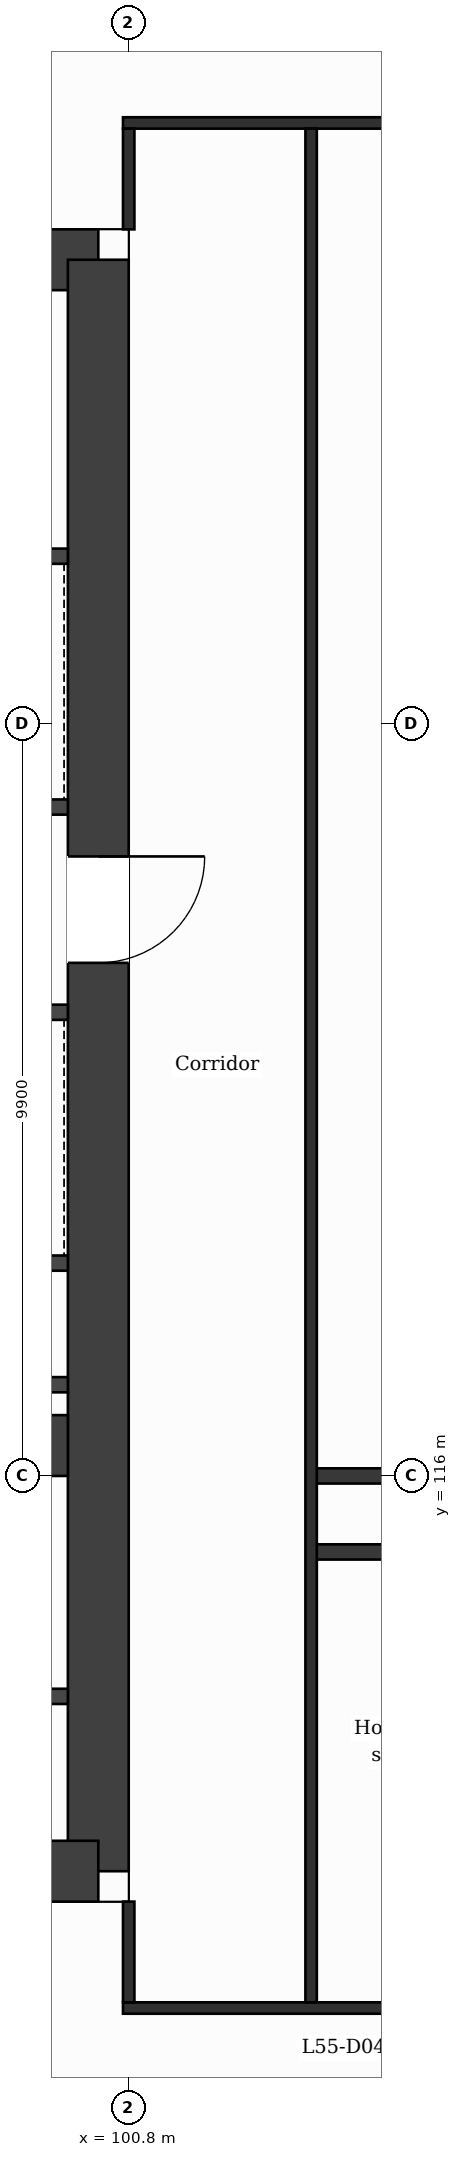
"""IFC4 building model, lengths in metres.
Left out: names, types, materials, properties, quantities, classifications, styles, units other than length and angle.
Written with IfcOpenShell. Run it as: python <this file> out.ifc"""

import sys

from ifc_helpers import new_model, si_unit, direction, frame, frame_2d, origin, place, context, subcontext, project, spatial, rectangle, extrude, element, fill, save


model = new_model("IFC4")
c1 = context("Model", 3, precision=1e-05, world=origin(), true_north=direction((0.0, 1.0)))
c2 = subcontext(c1, "Body", "Model", "MODEL_VIEW")
j1 = project(units=[si_unit("LENGTHUNIT", "METRE"), si_unit("PLANEANGLEUNIT", "RADIAN")], contexts=[c1])
p1 = place(None, origin())
s1 = spatial("IfcSite", under=j1, at=p1, CompositionType="ELEMENT")
p2 = place(p1, origin())
s2 = spatial("IfcBuilding", under=s1, at=p2, CompositionType="ELEMENT")
p3 = place(p2, frame((0.0, 0.0, 228.1)))
s3 = spatial("IfcBuildingStorey", under=s2, at=p3, CompositionType="ELEMENT", Elevation=228.1)
p4 = place(p3, frame((88.98, 132.0, 0.0), z_axis=(0.0, 0.0, 1.0), x_axis=(1.0, 0.0, 0.0)))
e1 = element("IfcWall", 1, at=p4, inside=s3, PredefinedType="SHEAR", context=c2, shape_type="SweptSolid", body=[
    extrude(rectangle(XDim=11.419, YDim=0.8, at=frame_2d((5.71, 0.0))), origin(), (0.0, 0.0, 1.0), 3.7),
])
p5 = place(p4, frame((6.833, 0.0, 0.0)))
e2 = element("IfcOpeningElement", 2, at=p5, cuts=e1, PredefinedType="OPENING", context=c2, shape_type="SweptSolid", body=[
    extrude(rectangle(XDim=1.2, YDim=2.1, at=frame_2d((0.6, 1.05))), frame((0.0, 0.41, 0.0), z_axis=(0.0, -1.0, 0.0), x_axis=(1.0, 0.0, 0.0)), (0.0, 0.0, 1.0), 0.82),
])
p6 = place(p3, frame((100.4, 132.0, 0.0), z_axis=(0.0, 0.0, 1.0), x_axis=(0.0, -1.0, 0.0)))
e3 = element("IfcWall", 3, at=p6, inside=s3, PredefinedType="SHEAR", context=c2, shape_type="SweptSolid", body=[
    extrude(rectangle(XDim=21.2, YDim=0.8, at=frame_2d((10.6, 0.0))), origin(), (0.0, 0.0, 1.0), 3.7),
])
p7 = place(p6, frame((7.85, 0.0, 0.0)))
e4 = element("IfcOpeningElement", 4, at=p7, cuts=e3, PredefinedType="OPENING", context=c2, shape_type="SweptSolid", body=[
    extrude(rectangle(XDim=1.4, YDim=2.1, at=frame_2d((0.7, 1.05))), frame((0.0, 0.41, 0.0), z_axis=(0.0, -1.0, 0.0), x_axis=(1.0, 0.0, 0.0)), (0.0, 0.0, 1.0), 0.82),
])
p8 = place(p3, frame((100.4, 110.8, 0.0), z_axis=(0.0, 0.0, 1.0), x_axis=(-1.0, 0.0, 0.0)))
e5 = element("IfcWall", 5, at=p8, inside=s3, PredefinedType="SHEAR", context=c2, shape_type="SweptSolid", body=[
    extrude(rectangle(XDim=14.273, YDim=0.8, at=frame_2d((7.137, 0.0))), origin(), (0.0, 0.0, 1.0), 3.7),
])
p9 = place(p8, frame((5.908, 0.0, 0.0)))
e6 = element("IfcOpeningElement", 6, at=p9, cuts=e5, PredefinedType="OPENING", context=c2, shape_type="SweptSolid", body=[
    extrude(rectangle(XDim=1.4, YDim=2.1, at=frame_2d((0.7, 1.05))), frame((0.0, 0.41, 0.0), z_axis=(0.0, -1.0, 0.0), x_axis=(1.0, 0.0, 0.0)), (0.0, 0.0, 1.0), 0.82),
])
p10 = place(p3, frame((94.7, 116.4, 0.0), z_axis=(0.0, 0.0, 1.0), x_axis=(1.0, 0.0, 0.0)))
e7 = element("IfcWall", 7, at=p10, inside=s3, PredefinedType="SHEAR", context=c2, shape_type="SweptSolid", body=[
    extrude(rectangle(XDim=5.3, YDim=0.8, at=frame_2d((2.65, 0.0))), origin(), (0.0, 0.0, 1.0), 3.7),
])
p11 = place(p3, frame((100.725, 109.0, 0.0), z_axis=(0.0, 0.0, 1.0), x_axis=(1.0, 0.0, 0.0)))
e8 = element("IfcWall", 8, at=p11, inside=s3, PredefinedType="PARTITIONING", context=c2, shape_type="SweptSolid", body=[
    extrude(rectangle(XDim=25.35, YDim=0.15, at=frame_2d((12.675, 0.0))), origin(), (0.0, 0.0, 1.0), 3.38),
])
p12 = place(p11, frame((6.8, 0.0, 0.0)))
e9 = element("IfcOpeningElement", 9, at=p12, cuts=e8, PredefinedType="OPENING", context=c2, shape_type="SweptSolid", body=[
    extrude(rectangle(XDim=1.0, YDim=2.1, at=frame_2d((0.5, 1.05))), frame((0.0, 0.085, 0.0), z_axis=(0.0, -1.0, 0.0), x_axis=(1.0, 0.0, 0.0)), (0.0, 0.0, 1.0), 0.17),
])
p13 = place(p11, frame((3.475, 0.0, 0.0)))
e10 = element("IfcOpeningElement", 10, at=p13, cuts=e8, PredefinedType="OPENING", context=c2, shape_type="SweptSolid", body=[
    extrude(rectangle(XDim=1.0, YDim=2.1, at=frame_2d((0.5, 1.05))), frame((0.0, 0.085, 0.0), z_axis=(0.0, -1.0, 0.0), x_axis=(1.0, 0.0, 0.0)), (0.0, 0.0, 1.0), 0.17),
])
p14 = place(p11, frame((10.5, 0.0, 0.0)))
e11 = element("IfcOpeningElement", 11, at=p14, cuts=e8, PredefinedType="OPENING", context=c2, shape_type="SweptSolid", body=[
    extrude(rectangle(XDim=1.0, YDim=2.1, at=frame_2d((0.5, 1.05))), frame((0.0, 0.085, 0.0), z_axis=(0.0, -1.0, 0.0), x_axis=(1.0, 0.0, 0.0)), (0.0, 0.0, 1.0), 0.17),
])
p15 = place(p11, frame((19.375, 0.0, 0.0)))
e12 = element("IfcOpeningElement", 12, at=p15, cuts=e8, PredefinedType="OPENING", context=c2, shape_type="SweptSolid", body=[
    extrude(rectangle(XDim=1.0, YDim=2.1, at=frame_2d((0.5, 1.05))), frame((0.0, 0.085, 0.0), z_axis=(0.0, -1.0, 0.0), x_axis=(1.0, 0.0, 0.0)), (0.0, 0.0, 1.0), 0.17),
])
p16 = place(p3, frame((95.127, 113.1, 0.0), z_axis=(0.0, 0.0, 1.0), x_axis=(1.0, 0.0, 0.0)))
e13 = element("IfcWall", 13, at=p16, inside=s3, PredefinedType="PARTITIONING", context=c2, shape_type="SweptSolid", body=[
    extrude(rectangle(XDim=4.873, YDim=0.2, at=frame_2d((2.437, 0.0))), origin(), (0.0, 0.0, 1.0), 3.38),
])
p17 = place(p16, frame((3.23, 0.0, 0.0)))
e14 = element("IfcOpeningElement", 14, at=p17, cuts=e13, PredefinedType="OPENING", context=c2, shape_type="SweptSolid", body=[
    extrude(rectangle(XDim=0.9, YDim=2.1, at=frame_2d((0.45, 1.05))), frame((0.0, 0.11, 0.0), z_axis=(0.0, -1.0, 0.0), x_axis=(1.0, 0.0, 0.0)), (0.0, 0.0, 1.0), 0.22),
])
p18 = place(p3, frame((103.2, 115.0, 0.0), z_axis=(0.0, 0.0, 1.0), x_axis=(1.0, 0.0, 0.0)))
e15 = element("IfcWall", 15, at=p18, inside=s3, PredefinedType="PARTITIONING", context=c2, shape_type="SweptSolid", body=[
    extrude(rectangle(XDim=3.1, YDim=0.2, at=frame_2d((1.55, 0.0))), origin(), (0.0, 0.0, 1.0), 3.38),
])
p19 = place(p3, frame((103.2, 116.0, 0.0), z_axis=(0.0, 0.0, 1.0), x_axis=(1.0, 0.0, 0.0)))
e16 = element("IfcWall", 16, at=p19, inside=s3, PredefinedType="PARTITIONING", context=c2, shape_type="SweptSolid", body=[
    extrude(rectangle(XDim=6.0, YDim=0.2, at=frame_2d((3.0, 0.0))), origin(), (0.0, 0.0, 1.0), 3.38),
])
for number, where, z_axis, x_axis in (
    (17, (95.227, 117.2, 0.0), (0.0, 0.0, 1.0), (1.0, 0.0, 0.0)),
    (18, (95.227, 118.8, 0.0), (0.0, 0.0, 1.0), (1.0, 0.0, 0.0)),
):
    element("IfcWall", number, at=place(p3, frame(where, z_axis=z_axis, x_axis=x_axis)), inside=s3, PredefinedType="PARTITIONING", context=c2, shape_type="SweptSolid", body=[
        extrude(rectangle(XDim=4.773, YDim=0.2, at=frame_2d((2.386, 0.0))), origin(), (0.0, 0.0, 1.0), 3.38),
    ])
p20 = place(p3, frame((95.227, 122.1, 0.0), z_axis=(0.0, 0.0, 1.0), x_axis=(1.0, 0.0, 0.0)))
e19 = element("IfcWall", 19, at=p20, inside=s3, PredefinedType="PARTITIONING", context=c2, shape_type="SweptSolid", body=[
    extrude(rectangle(XDim=4.773, YDim=0.2, at=frame_2d((2.386, 0.0))), origin(), (0.0, 0.0, 1.0), 3.38),
])
p21 = place(p20, frame((0.585, 0.0, 0.0)))
e20 = element("IfcOpeningElement", 20, at=p21, cuts=e19, PredefinedType="OPENING", context=c2, shape_type="SweptSolid", body=[
    extrude(rectangle(XDim=1.1, YDim=2.1, at=frame_2d((0.55, 1.05))), frame((0.0, 0.11, 0.0), z_axis=(0.0, -1.0, 0.0), x_axis=(1.0, 0.0, 0.0)), (0.0, 0.0, 1.0), 0.22),
])
p22 = place(p20, frame((3.03, 0.0, 0.0)))
e21 = element("IfcOpeningElement", 21, at=p22, cuts=e19, PredefinedType="OPENING", context=c2, shape_type="SweptSolid", body=[
    extrude(rectangle(XDim=1.1, YDim=2.1, at=frame_2d((0.55, 1.05))), frame((0.0, 0.11, 0.0), z_axis=(0.0, -1.0, 0.0), x_axis=(1.0, 0.0, 0.0)), (0.0, 0.0, 1.0), 0.22),
])
p23 = place(p3, frame((92.702, 124.8, 0.0), z_axis=(0.0, 0.0, 1.0), x_axis=(1.0, 0.0, 0.0)))
e22 = element("IfcWall", 22, at=p23, inside=s3, PredefinedType="PARTITIONING", context=c2, shape_type="SweptSolid", body=[
    extrude(rectangle(XDim=7.298, YDim=0.2, at=frame_2d((3.649, 0.0))), origin(), (0.0, 0.0, 1.0), 3.38),
])
p24 = place(p23, frame((5.405, 0.0, 0.0)))
e23 = element("IfcOpeningElement", 23, at=p24, cuts=e22, PredefinedType="OPENING", context=c2, shape_type="SweptSolid", body=[
    extrude(rectangle(XDim=1.1, YDim=2.1, at=frame_2d((0.55, 1.05))), frame((0.0, 0.11, 0.0), z_axis=(0.0, -1.0, 0.0), x_axis=(1.0, 0.0, 0.0)), (0.0, 0.0, 1.0), 0.22),
])
p25 = place(p3, frame((92.827, 128.1, 0.0), z_axis=(0.0, 0.0, 1.0), x_axis=(1.0, 0.0, 0.0)))
e24 = element("IfcWall", 24, at=p25, inside=s3, PredefinedType="PARTITIONING", context=c2, shape_type="SweptSolid", body=[
    extrude(rectangle(XDim=7.173, YDim=0.2, at=frame_2d((3.586, 0.0))), origin(), (0.0, 0.0, 1.0), 3.38),
])
p26 = place(p25, frame((3.184, 0.0, 0.0)))
e25 = element("IfcOpeningElement", 25, at=p26, cuts=e24, PredefinedType="OPENING", context=c2, shape_type="SweptSolid", body=[
    extrude(rectangle(XDim=1.1, YDim=2.1, at=frame_2d((0.55, 1.05))), frame((0.0, 0.11, 0.0), z_axis=(0.0, -1.0, 0.0), x_axis=(1.0, 0.0, 0.0)), (0.0, 0.0, 1.0), 0.22),
])
p27 = place(p3, frame((100.725, 133.8, 0.0), z_axis=(0.0, 0.0, 1.0), x_axis=(1.0, 0.0, 0.0)))
e26 = element("IfcWall", 26, at=p27, inside=s3, PredefinedType="PARTITIONING", context=c2, shape_type="SweptSolid", body=[
    extrude(rectangle(XDim=25.35, YDim=0.15, at=frame_2d((12.675, 0.0))), origin(), (0.0, 0.0, 1.0), 3.38),
])
p28 = place(p27, frame((6.05, 0.0, 0.0)))
e27 = element("IfcOpeningElement", 27, at=p28, cuts=e26, PredefinedType="OPENING", context=c2, shape_type="SweptSolid", body=[
    extrude(rectangle(XDim=1.0, YDim=2.1, at=frame_2d((0.5, 1.05))), frame((0.0, 0.085, 0.0), z_axis=(0.0, -1.0, 0.0), x_axis=(1.0, 0.0, 0.0)), (0.0, 0.0, 1.0), 0.17),
])
p29 = place(p27, frame((19.375, 0.0, 0.0)))
e28 = element("IfcOpeningElement", 28, at=p29, cuts=e26, PredefinedType="OPENING", context=c2, shape_type="SweptSolid", body=[
    extrude(rectangle(XDim=1.0, YDim=2.1, at=frame_2d((0.5, 1.05))), frame((0.0, 0.085, 0.0), z_axis=(0.0, -1.0, 0.0), x_axis=(1.0, 0.0, 0.0)), (0.0, 0.0, 1.0), 0.17),
])
p30 = place(p3, frame((100.8, 109.075, 0.0), z_axis=(0.0, 0.0, 1.0), x_axis=(0.0, 1.0, 0.0)))
e29 = element("IfcWall", 29, at=p30, inside=s3, PredefinedType="PARTITIONING", context=c2, shape_type="SweptSolid", body=[
    extrude(rectangle(XDim=1.325, YDim=0.15, at=frame_2d((0.663, 0.0))), origin(), (0.0, 0.0, 1.0), 3.38),
])
p31 = place(p3, frame((100.8, 132.4, 0.0), z_axis=(0.0, 0.0, 1.0), x_axis=(0.0, 1.0, 0.0)))
e30 = element("IfcWall", 30, at=p31, inside=s3, PredefinedType="PARTITIONING", context=c2, shape_type="SweptSolid", body=[
    extrude(rectangle(XDim=1.325, YDim=0.15, at=frame_2d((0.663, 0.0))), origin(), (0.0, 0.0, 1.0), 3.38),
])
p32 = place(p3, frame((103.2, 109.075, 0.0), z_axis=(0.0, 0.0, 1.0), x_axis=(0.0, 1.0, 0.0)))
e31 = element("IfcWall", 31, at=p32, inside=s3, PredefinedType="PARTITIONING", context=c2, shape_type="SweptSolid", body=[
    extrude(rectangle(XDim=24.65, YDim=0.15, at=frame_2d((12.325, 0.0))), origin(), (0.0, 0.0, 1.0), 3.38),
])
p33 = place(p7, origin())
e32 = element("IfcDoor", 32, at=p33, inside=s3, OperationType="SINGLE_SWING_LEFT", PredefinedType="DOOR", context=c2, shape_type="SweptSolid", body=[
    extrude(rectangle(XDim=1.4, YDim=2.1, at=frame_2d((0.7, 1.05))), frame((0.0, 0.025, 0.0), z_axis=(0.0, -1.0, 0.0), x_axis=(1.0, 0.0, 0.0)), (0.0, 0.0, 1.0), 0.05),
])
fill(e4, e32)
save(model, sys.argv[1])
